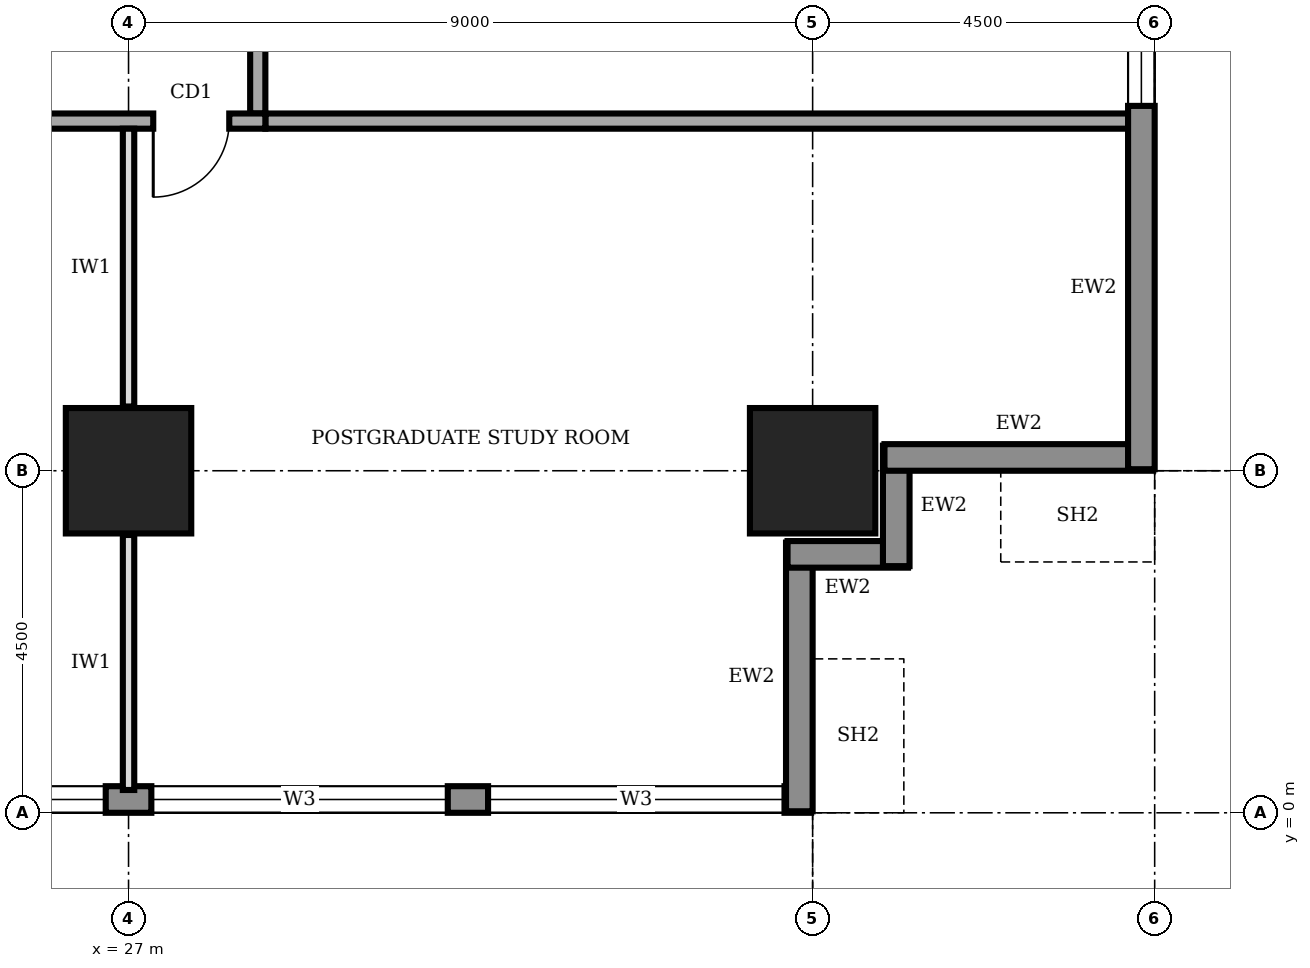
"""IFC4 building model, lengths in metres.
Left out: names, types, materials, properties, quantities, classifications, styles, units other than length and angle.
Written with IfcOpenShell. Run it as: python <this file> out.ifc"""

import sys

from ifc_helpers import new_model, si_unit, direction, frame, frame_2d, origin, origin_2d, place, context, subcontext, project, spatial, rectangle, extrude, element, fill, save


model = new_model("IFC4")
c1 = context("Model", 3, precision=1e-05, world=origin(), true_north=direction((0.0, 1.0)))
c2 = subcontext(c1, "Body", "Model", "MODEL_VIEW")
j1 = project(units=[si_unit("LENGTHUNIT", "METRE"), si_unit("PLANEANGLEUNIT", "RADIAN")], contexts=[c1])
p1 = place(None, origin())
s1 = spatial("IfcSite", under=j1, at=p1, CompositionType="ELEMENT")
p2 = place(p1, origin())
s2 = spatial("IfcBuilding", under=s1, at=p2, CompositionType="ELEMENT")
p3 = place(p2, frame((0.0, 0.0, 177.0)))
s3 = spatial("IfcBuildingStorey", under=s2, at=p3, CompositionType="ELEMENT", Elevation=177.0)
for number, where, z_axis, x_axis in (
    (1, (27.0, 4.5, 0.0), (0.0, 0.0, 1.0), (1.0, 0.0, 0.0)),
    (2, (36.0, 4.5, 0.0), (0.0, 0.0, 1.0), (1.0, 0.0, 0.0)),
):
    element("IfcColumn", number, at=place(p3, frame(where, z_axis=z_axis, x_axis=x_axis)), inside=s3, PredefinedType="COLUMN", context=c2, shape_type="SweptSolid", body=[
        extrude(rectangle(XDim=1.65, YDim=1.65, at=origin_2d()), origin(), (0.0, 0.0, 1.0), 4.0),
    ])
p4 = place(p3, frame((4.52, 0.175, 0.0), z_axis=(0.0, 0.0, 1.0), x_axis=(1.0, 0.0, 0.0)))
e3 = element("IfcWall", 3, at=p4, inside=s3, PredefinedType="STANDARD", context=c2, shape_type="SweptSolid", body=[
    extrude(rectangle(XDim=31.46, YDim=0.35, at=frame_2d((15.73, 0.0))), origin(), (0.0, 0.0, 1.0), 3.75),
])
p5 = place(p4, frame((4.78, 0.0, 0.95)))
e4 = element("IfcOpeningElement", 4, at=p5, cuts=e3, PredefinedType="OPENING", context=c2, shape_type="SweptSolid", body=[
    extrude(rectangle(XDim=3.9, YDim=1.8, at=frame_2d((1.95, 0.9))), frame((0.0, 0.185, 0.0), z_axis=(0.0, -1.0, 0.0), x_axis=(1.0, 0.0, 0.0)), (0.0, 0.0, 1.0), 0.37),
])
p6 = place(p4, frame((9.28, 0.0, 0.95)))
e5 = element("IfcOpeningElement", 5, at=p6, cuts=e3, PredefinedType="OPENING", context=c2, shape_type="SweptSolid", body=[
    extrude(rectangle(XDim=3.9, YDim=1.8, at=frame_2d((1.95, 0.9))), frame((0.0, 0.185, 0.0), z_axis=(0.0, -1.0, 0.0), x_axis=(1.0, 0.0, 0.0)), (0.0, 0.0, 1.0), 0.37),
])
p7 = place(p4, frame((13.78, 0.0, 0.95)))
e6 = element("IfcOpeningElement", 6, at=p7, cuts=e3, PredefinedType="OPENING", context=c2, shape_type="SweptSolid", body=[
    extrude(rectangle(XDim=3.9, YDim=1.8, at=frame_2d((1.95, 0.9))), frame((0.0, 0.185, 0.0), z_axis=(0.0, -1.0, 0.0), x_axis=(1.0, 0.0, 0.0)), (0.0, 0.0, 1.0), 0.37),
])
p8 = place(p4, frame((18.28, 0.0, 0.95)))
e7 = element("IfcOpeningElement", 7, at=p8, cuts=e3, PredefinedType="OPENING", context=c2, shape_type="SweptSolid", body=[
    extrude(rectangle(XDim=3.9, YDim=1.8, at=frame_2d((1.95, 0.9))), frame((0.0, 0.185, 0.0), z_axis=(0.0, -1.0, 0.0), x_axis=(1.0, 0.0, 0.0)), (0.0, 0.0, 1.0), 0.37),
])
p9 = place(p4, frame((22.78, 0.0, 0.95)))
e8 = element("IfcOpeningElement", 8, at=p9, cuts=e3, PredefinedType="OPENING", context=c2, shape_type="SweptSolid", body=[
    extrude(rectangle(XDim=3.9, YDim=1.8, at=frame_2d((1.95, 0.9))), frame((0.0, 0.185, 0.0), z_axis=(0.0, -1.0, 0.0), x_axis=(1.0, 0.0, 0.0)), (0.0, 0.0, 1.0), 0.37),
])
p10 = place(p4, frame((27.21, 0.0, 0.95)))
e9 = element("IfcOpeningElement", 9, at=p10, cuts=e3, PredefinedType="OPENING", context=c2, shape_type="SweptSolid", body=[
    extrude(rectangle(XDim=3.9, YDim=1.8, at=frame_2d((1.95, 0.9))), frame((0.0, 0.185, 0.0), z_axis=(0.0, -1.0, 0.0), x_axis=(1.0, 0.0, 0.0)), (0.0, 0.0, 1.0), 0.37),
])
p11 = place(p3, frame((35.825, 0.02, 0.0), z_axis=(0.0, 0.0, 1.0), x_axis=(0.0, 1.0, 0.0)))
e10 = element("IfcWall", 10, at=p11, inside=s3, PredefinedType="STANDARD", context=c2, shape_type="SweptSolid", body=[
    extrude(rectangle(XDim=3.535, YDim=0.35, at=frame_2d((1.768, 0.0))), origin(), (0.0, 0.0, 1.0), 2.85),
])
for number, where, z_axis, x_axis in (
    (11, (35.67, 3.4, 0.0), (0.0, 0.0, 1.0), (1.0, 0.0, 0.0)),
    (12, (37.1, 3.245, 0.0), (0.0, 0.0, 1.0), (0.0, 1.0, 0.0)),
):
    element("IfcWall", number, at=place(p3, frame(where, z_axis=z_axis, x_axis=x_axis)), inside=s3, PredefinedType="STANDARD", context=c2, shape_type="SweptSolid", body=[
        extrude(rectangle(XDim=1.585, YDim=0.35, at=frame_2d((0.792, 0.0))), origin(), (0.0, 0.0, 1.0), 3.75),
    ])
p12 = place(p3, frame((36.945, 4.675, 0.0), z_axis=(0.0, 0.0, 1.0), x_axis=(1.0, 0.0, 0.0)))
e13 = element("IfcWall", 13, at=p12, inside=s3, PredefinedType="STANDARD", context=c2, shape_type="SweptSolid", body=[
    extrude(rectangle(XDim=3.535, YDim=0.35, at=frame_2d((1.768, 0.0))), origin(), (0.0, 0.0, 1.0), 2.85),
])
p13 = place(p3, frame((40.325, 4.52, 0.0), z_axis=(0.0, 0.0, 1.0), x_axis=(0.0, 1.0, 0.0)))
e14 = element("IfcWall", 14, at=p13, inside=s3, PredefinedType="STANDARD", context=c2, shape_type="SweptSolid", body=[
    extrude(rectangle(XDim=31.46, YDim=0.35, at=frame_2d((15.73, 0.0))), origin(), (0.0, 0.0, 1.0), 3.75),
])
p14 = place(p13, frame((4.78, 0.0, 0.95)))
e15 = element("IfcOpeningElement", 15, at=p14, cuts=e14, PredefinedType="OPENING", context=c2, shape_type="SweptSolid", body=[
    extrude(rectangle(XDim=3.9, YDim=1.8, at=frame_2d((1.95, 0.9))), frame((0.0, 0.185, 0.0), z_axis=(0.0, -1.0, 0.0), x_axis=(1.0, 0.0, 0.0)), (0.0, 0.0, 1.0), 0.37),
])
p15 = place(p13, frame((9.28, 0.0, 0.95)))
e16 = element("IfcOpeningElement", 16, at=p15, cuts=e14, PredefinedType="OPENING", context=c2, shape_type="SweptSolid", body=[
    extrude(rectangle(XDim=3.9, YDim=1.8, at=frame_2d((1.95, 0.9))), frame((0.0, 0.185, 0.0), z_axis=(0.0, -1.0, 0.0), x_axis=(1.0, 0.0, 0.0)), (0.0, 0.0, 1.0), 0.37),
])
p16 = place(p13, frame((13.78, 0.0, 0.95)))
e17 = element("IfcOpeningElement", 17, at=p16, cuts=e14, PredefinedType="OPENING", context=c2, shape_type="SweptSolid", body=[
    extrude(rectangle(XDim=3.9, YDim=1.8, at=frame_2d((1.95, 0.9))), frame((0.0, 0.185, 0.0), z_axis=(0.0, -1.0, 0.0), x_axis=(1.0, 0.0, 0.0)), (0.0, 0.0, 1.0), 0.37),
])
p17 = place(p13, frame((18.28, 0.0, 0.95)))
e18 = element("IfcOpeningElement", 18, at=p17, cuts=e14, PredefinedType="OPENING", context=c2, shape_type="SweptSolid", body=[
    extrude(rectangle(XDim=3.9, YDim=1.8, at=frame_2d((1.95, 0.9))), frame((0.0, 0.185, 0.0), z_axis=(0.0, -1.0, 0.0), x_axis=(1.0, 0.0, 0.0)), (0.0, 0.0, 1.0), 0.37),
])
p18 = place(p13, frame((22.78, 0.0, 0.95)))
e19 = element("IfcOpeningElement", 19, at=p18, cuts=e14, PredefinedType="OPENING", context=c2, shape_type="SweptSolid", body=[
    extrude(rectangle(XDim=3.9, YDim=1.8, at=frame_2d((1.95, 0.9))), frame((0.0, 0.185, 0.0), z_axis=(0.0, -1.0, 0.0), x_axis=(1.0, 0.0, 0.0)), (0.0, 0.0, 1.0), 0.37),
])
p19 = place(p13, frame((27.21, 0.0, 0.95)))
e20 = element("IfcOpeningElement", 20, at=p19, cuts=e14, PredefinedType="OPENING", context=c2, shape_type="SweptSolid", body=[
    extrude(rectangle(XDim=3.9, YDim=1.8, at=frame_2d((1.95, 0.9))), frame((0.0, 0.185, 0.0), z_axis=(0.0, -1.0, 0.0), x_axis=(1.0, 0.0, 0.0)), (0.0, 0.0, 1.0), 0.37),
])
p20 = place(p3, frame((11.9, 9.1, 0.0), z_axis=(0.0, 0.0, 1.0), x_axis=(1.0, 0.0, 0.0)))
e21 = element("IfcWall", 21, at=p20, inside=s3, PredefinedType="SOLIDWALL", context=c2, shape_type="SweptSolid", body=[
    extrude(rectangle(XDim=16.9, YDim=0.2, at=frame_2d((8.45, 0.0))), origin(), (0.0, 0.0, 1.0), 3.75),
])
p21 = place(p20, frame((15.425, 0.0, 0.0)))
e22 = element("IfcOpeningElement", 22, at=p21, cuts=e21, PredefinedType="OPENING", context=c2, shape_type="SweptSolid", body=[
    extrude(rectangle(XDim=1.0, YDim=2.1, at=frame_2d((0.5, 1.05))), frame((0.0, 0.11, 0.0), z_axis=(0.0, -1.0, 0.0), x_axis=(1.0, 0.0, 0.0)), (0.0, 0.0, 1.0), 0.22),
])
p22 = place(p3, frame((28.7, 9.2, 0.0), z_axis=(0.0, 0.0, 1.0), x_axis=(0.0, 1.0, 0.0)))
e23 = element("IfcWall", 23, at=p22, inside=s3, PredefinedType="SOLIDWALL", context=c2, shape_type="SweptSolid", body=[
    extrude(rectangle(XDim=22.3, YDim=0.2, at=frame_2d((11.15, 0.0))), origin(), (0.0, 0.0, 1.0), 3.75),
])
p23 = place(p22, frame((1.55, 0.0, 0.0)))
e24 = element("IfcOpeningElement", 24, at=p23, cuts=e23, PredefinedType="OPENING", context=c2, shape_type="SweptSolid", body=[
    extrude(rectangle(XDim=1.0, YDim=2.1, at=frame_2d((0.5, 1.05))), frame((0.0, 0.11, 0.0), z_axis=(0.0, -1.0, 0.0), x_axis=(1.0, 0.0, 0.0)), (0.0, 0.0, 1.0), 0.22),
])
p24 = place(p22, frame((6.05, 0.0, 0.0)))
e25 = element("IfcOpeningElement", 25, at=p24, cuts=e23, PredefinedType="OPENING", context=c2, shape_type="SweptSolid", body=[
    extrude(rectangle(XDim=1.0, YDim=2.1, at=frame_2d((0.5, 1.05))), frame((0.0, 0.11, 0.0), z_axis=(0.0, -1.0, 0.0), x_axis=(1.0, 0.0, 0.0)), (0.0, 0.0, 1.0), 0.22),
])
p25 = place(p22, frame((10.55, 0.0, 0.0)))
e26 = element("IfcOpeningElement", 26, at=p25, cuts=e23, PredefinedType="OPENING", context=c2, shape_type="SweptSolid", body=[
    extrude(rectangle(XDim=1.0, YDim=2.1, at=frame_2d((0.5, 1.05))), frame((0.0, 0.11, 0.0), z_axis=(0.0, -1.0, 0.0), x_axis=(1.0, 0.0, 0.0)), (0.0, 0.0, 1.0), 0.22),
])
p26 = place(p22, frame((15.05, 0.0, 0.0)))
e27 = element("IfcOpeningElement", 27, at=p26, cuts=e23, PredefinedType="OPENING", context=c2, shape_type="SweptSolid", body=[
    extrude(rectangle(XDim=1.0, YDim=2.1, at=frame_2d((0.5, 1.05))), frame((0.0, 0.11, 0.0), z_axis=(0.0, -1.0, 0.0), x_axis=(1.0, 0.0, 0.0)), (0.0, 0.0, 1.0), 0.22),
])
p27 = place(p22, frame((19.55, 0.0, 0.0)))
e28 = element("IfcOpeningElement", 28, at=p27, cuts=e23, PredefinedType="OPENING", context=c2, shape_type="SweptSolid", body=[
    extrude(rectangle(XDim=1.0, YDim=2.1, at=frame_2d((0.5, 1.05))), frame((0.0, 0.11, 0.0), z_axis=(0.0, -1.0, 0.0), x_axis=(1.0, 0.0, 0.0)), (0.0, 0.0, 1.0), 0.22),
])
p28 = place(p3, frame((28.8, 9.1, 0.0), z_axis=(0.0, 0.0, 1.0), x_axis=(1.0, 0.0, 0.0)))
e29 = element("IfcWall", 29, at=p28, inside=s3, PredefinedType="SOLIDWALL", context=c2, shape_type="SweptSolid", body=[
    extrude(rectangle(XDim=11.4, YDim=0.2, at=frame_2d((5.7, 0.0))), origin(), (0.0, 0.0, 1.0), 3.75),
])
p29 = place(p3, frame((27.0, 0.3, 0.0), z_axis=(0.0, 0.0, 1.0), x_axis=(0.0, 1.0, 0.0)))
e30 = element("IfcWall", 30, at=p29, inside=s3, PredefinedType="PARTITIONING", context=c2, shape_type="SweptSolid", body=[
    extrude(rectangle(XDim=3.355, YDim=0.15, at=frame_2d((1.677, 0.0))), origin(), (0.0, 0.0, 1.0), 2.85),
])
p30 = place(p3, frame((27.0, 5.345, 0.0), z_axis=(0.0, 0.0, 1.0), x_axis=(0.0, 1.0, 0.0)))
e31 = element("IfcWall", 31, at=p30, inside=s3, PredefinedType="PARTITIONING", context=c2, shape_type="SweptSolid", body=[
    extrude(rectangle(XDim=3.655, YDim=0.15, at=frame_2d((1.828, 0.0))), origin(), (0.0, 0.0, 1.0), 2.85),
])
p31 = place(p8, origin())
e32 = element("IfcWindow", 32, at=p31, inside=s3, PartitioningType="SINGLE_PANEL", PredefinedType="WINDOW", context=c2, shape_type="SweptSolid", body=[
    extrude(rectangle(XDim=3.9, YDim=1.8, at=frame_2d((1.95, 0.9))), frame((0.0, 0.03, 0.0), z_axis=(0.0, -1.0, 0.0), x_axis=(1.0, 0.0, 0.0)), (0.0, 0.0, 1.0), 0.06),
])
fill(e7, e32)
p32 = place(p9, origin())
e33 = element("IfcWindow", 33, at=p32, inside=s3, PartitioningType="SINGLE_PANEL", PredefinedType="WINDOW", context=c2, shape_type="SweptSolid", body=[
    extrude(rectangle(XDim=3.9, YDim=1.8, at=frame_2d((1.95, 0.9))), frame((0.0, 0.03, 0.0), z_axis=(0.0, -1.0, 0.0), x_axis=(1.0, 0.0, 0.0)), (0.0, 0.0, 1.0), 0.06),
])
fill(e8, e33)
p33 = place(p10, origin())
e34 = element("IfcWindow", 34, at=p33, inside=s3, PartitioningType="SINGLE_PANEL", PredefinedType="WINDOW", context=c2, shape_type="SweptSolid", body=[
    extrude(rectangle(XDim=3.9, YDim=1.8, at=frame_2d((1.95, 0.9))), frame((0.0, 0.03, 0.0), z_axis=(0.0, -1.0, 0.0), x_axis=(1.0, 0.0, 0.0)), (0.0, 0.0, 1.0), 0.06),
])
fill(e9, e34)
p34 = place(p14, origin())
e35 = element("IfcWindow", 35, at=p34, inside=s3, PartitioningType="SINGLE_PANEL", PredefinedType="WINDOW", context=c2, shape_type="SweptSolid", body=[
    extrude(rectangle(XDim=3.9, YDim=1.8, at=frame_2d((1.95, 0.9))), frame((0.0, 0.03, 0.0), z_axis=(0.0, -1.0, 0.0), x_axis=(1.0, 0.0, 0.0)), (0.0, 0.0, 1.0), 0.06),
])
fill(e15, e35)
p35 = place(p21, frame((1.0, 0.0, 0.0), z_axis=(0.0, 0.0, 1.0), x_axis=(-1.0, 0.0, 0.0)))
e36 = element("IfcDoor", 36, at=p35, inside=s3, OperationType="SINGLE_SWING_RIGHT", PredefinedType="DOOR", context=c2, shape_type="SweptSolid", body=[
    extrude(rectangle(XDim=1.0, YDim=2.1, at=frame_2d((0.5, 1.05))), frame((0.0, 0.025, 0.0), z_axis=(0.0, -1.0, 0.0), x_axis=(1.0, 0.0, 0.0)), (0.0, 0.0, 1.0), 0.05),
])
fill(e22, e36)
save(model, sys.argv[1])
